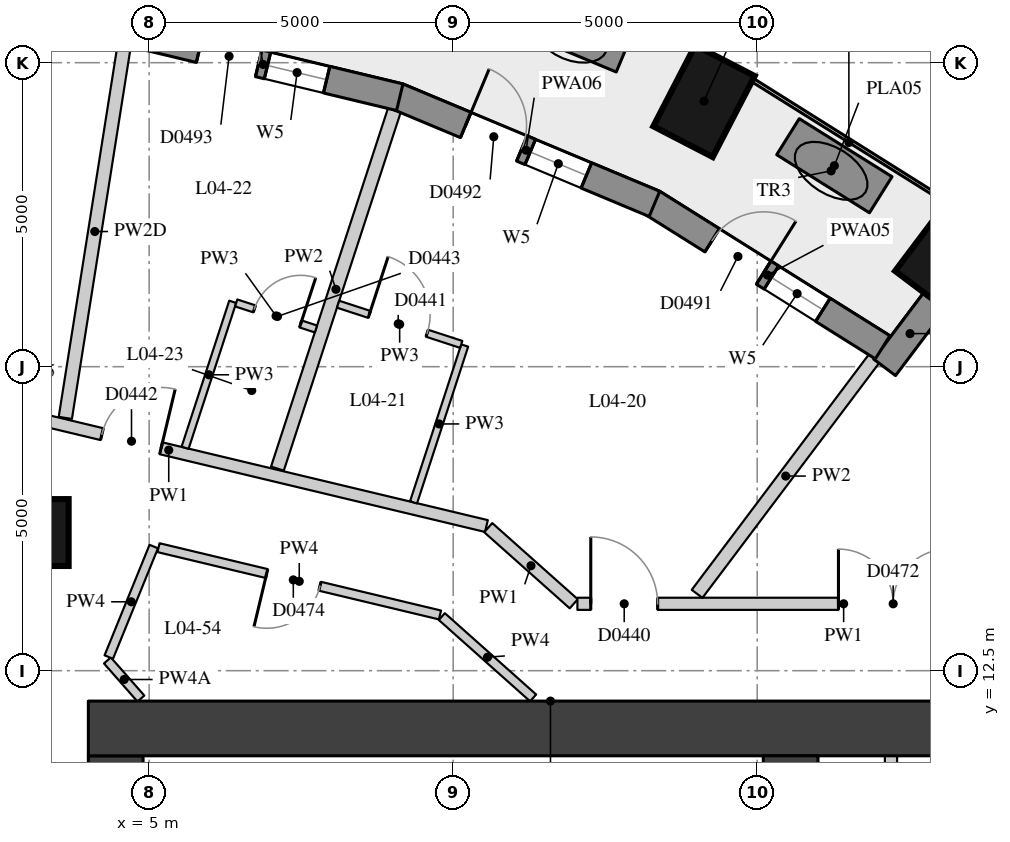
"""IFC4 building model, lengths in metres.
Left out: names, types, materials, properties, quantities, classifications, styles, units other than length and angle.
Written with IfcOpenShell. Run it as: python <this file> out.ifc"""

import sys

from ifc_helpers import new_model, si_unit, direction, frame, frame_2d, origin, origin_2d, place, context, subcontext, project, spatial, rectangle, extrude, element, fill, save


model = new_model("IFC4")
c1 = context("Model", 3, precision=1e-05, world=origin(), true_north=direction((0.0, 1.0)))
c2 = subcontext(c1, "Body", "Model", "MODEL_VIEW")
j1 = project(units=[si_unit("LENGTHUNIT", "METRE"), si_unit("PLANEANGLEUNIT", "RADIAN")], contexts=[c1])
p1 = place(None, origin())
s1 = spatial("IfcSite", under=j1, at=p1, CompositionType="ELEMENT")
p2 = place(p1, origin())
s2 = spatial("IfcBuilding", under=s1, at=p2, CompositionType="ELEMENT")
p3 = place(p2, frame((0.0, 0.0, 21.7)))
s3 = spatial("IfcBuildingStorey", under=s2, at=p3, CompositionType="ELEMENT", Elevation=21.7)
for number, where, z_axis, x_axis in (
    (1, (18.159, 19.343, 0.0), (0.0, 0.0, 1.0), (0.601, 0.799, 0.0)),
    (2, (14.125, 21.867, 0.0), (0.0, 0.0, 1.0), (0.46, 0.888, 0.0)),
):
    element("IfcColumn", number, at=place(p3, frame(where, z_axis=z_axis, x_axis=x_axis)), inside=s3, PredefinedType="COLUMN", context=c2, shape_type="SweptSolid", body=[
        extrude(rectangle(XDim=1.5, YDim=1.1, at=origin_2d()), origin(), (0.0, 0.0, 1.0), 3.3),
    ])
p4 = place(p3, frame((3.126, 14.772, 0.0), z_axis=(0.0, 0.0, 1.0), x_axis=(1.0, 0.0, 0.0)))
e3 = element("IfcColumn", 3, at=p4, inside=s3, PredefinedType="COLUMN", context=c2, shape_type="SweptSolid", body=[
    extrude(rectangle(XDim=1.1, YDim=1.1, at=origin_2d()), origin(), (0.0, 0.0, 1.0), 3.3),
])
p5 = place(p3, frame((17.932, 18.6, 0.0), z_axis=(0.0, 0.0, 1.0), x_axis=(-0.601262851241, -0.799051302306, 0.0)))
e4 = element("IfcWall", 4, at=p5, inside=s3, PredefinedType="SOLIDWALL", context=c2, shape_type="SweptSolid", body=[
    extrude(rectangle(XDim=1.391, YDim=0.45, at=frame_2d((0.696, 0.0))), origin(), (0.0, 0.0, 1.0), 3.02),
])
p6 = place(p3, frame((17.062, 17.819, 0.0), z_axis=(0.0, 0.0, 1.0), x_axis=(-0.846990101364, 0.531608660757, 0.0)))
e5 = element("IfcWall", 5, at=p6, inside=s3, PredefinedType="SOLIDWALL", context=c2, shape_type="SweptSolid", body=[
    extrude(rectangle(XDim=4.469, YDim=0.45, at=frame_2d((2.234, 0.0))), origin(), (0.0, 0.0, 1.0), 3.02),
])
p7 = place(p6, frame((1.159, 0.0, 0.4)))
e6 = element("IfcOpeningElement", 6, at=p7, cuts=e5, PredefinedType="OPENING", context=c2, shape_type="SweptSolid", body=[
    extrude(rectangle(XDim=1.0, YDim=1.75, at=frame_2d((0.5, 0.875))), frame((0.0, 0.235, 0.0), z_axis=(0.0, -1.0, 0.0), x_axis=(1.0, 0.0, 0.0)), (0.0, 0.0, 1.0), 0.47),
])
p8 = place(p6, frame((2.31, 0.0, 0.0)))
e7 = element("IfcOpeningElement", 7, at=p8, cuts=e5, PredefinedType="OPENING", context=c2, shape_type="SweptSolid", body=[
    extrude(rectangle(XDim=1.0, YDim=2.15, at=frame_2d((0.5, 1.075))), frame((0.0, 0.235, 0.0), z_axis=(0.0, -1.0, 0.0), x_axis=(1.0, 0.0, 0.0)), (0.0, 0.0, 1.0), 0.47),
])
p9 = place(p3, frame((13.31, 20.178, 0.0), z_axis=(0.0, 0.0, 1.0), x_axis=(-0.922634412489, 0.385675693935, 0.0)))
e8 = element("IfcWall", 8, at=p9, inside=s3, PredefinedType="SOLIDWALL", context=c2, shape_type="SweptSolid", body=[
    extrude(rectangle(XDim=4.577, YDim=0.45, at=frame_2d((2.288, 0.0))), origin(), (0.0, 0.0, 1.0), 3.02),
])
p10 = place(p9, frame((1.213, 0.0, 0.4)))
e9 = element("IfcOpeningElement", 9, at=p10, cuts=e8, PredefinedType="OPENING", context=c2, shape_type="SweptSolid", body=[
    extrude(rectangle(XDim=1.0, YDim=1.75, at=frame_2d((0.5, 0.875))), frame((0.0, 0.235, 0.0), z_axis=(0.0, -1.0, 0.0), x_axis=(1.0, 0.0, 0.0)), (0.0, 0.0, 1.0), 0.47),
])
p11 = place(p9, frame((2.363, 0.0, 0.0)))
e10 = element("IfcOpeningElement", 10, at=p11, cuts=e8, PredefinedType="OPENING", context=c2, shape_type="SweptSolid", body=[
    extrude(rectangle(XDim=1.0, YDim=2.15, at=frame_2d((0.5, 1.075))), frame((0.0, 0.235, 0.0), z_axis=(0.0, -1.0, 0.0), x_axis=(1.0, 0.0, 0.0)), (0.0, 0.0, 1.0), 0.47),
])
p12 = place(p3, frame((9.122, 21.932, 0.0), z_axis=(0.0, 0.0, 1.0), x_axis=(-0.972346547441, 0.233542697764, 0.0)))
e11 = element("IfcWall", 11, at=p12, inside=s3, PredefinedType="SOLIDWALL", context=c2, shape_type="SweptSolid", body=[
    extrude(rectangle(XDim=4.624, YDim=0.45, at=frame_2d((2.312, 0.0))), origin(), (0.0, 0.0, 1.0), 3.02),
])
p13 = place(p12, frame((1.237, 0.0, 0.4)))
e12 = element("IfcOpeningElement", 12, at=p13, cuts=e11, PredefinedType="OPENING", context=c2, shape_type="SweptSolid", body=[
    extrude(rectangle(XDim=1.0, YDim=1.75, at=frame_2d((0.5, 0.875))), frame((0.0, 0.235, 0.0), z_axis=(0.0, -1.0, 0.0), x_axis=(1.0, 0.0, 0.0)), (0.0, 0.0, 1.0), 0.47),
])
p14 = place(p12, frame((2.387, 0.0, 0.0)))
e13 = element("IfcOpeningElement", 13, at=p14, cuts=e11, PredefinedType="OPENING", context=c2, shape_type="SweptSolid", body=[
    extrude(rectangle(XDim=1.0, YDim=2.15, at=frame_2d((0.5, 1.075))), frame((0.0, 0.235, 0.0), z_axis=(0.0, -1.0, 0.0), x_axis=(1.0, 0.0, 0.0)), (0.0, 0.0, 1.0), 0.47),
])
p15 = place(p3, frame((17.032, 20.328, 0.0), z_axis=(0.0, 0.0, 1.0), x_axis=(-0.847609446823, 0.530620604252, 0.0)))
e14 = element("IfcWall", 14, at=p15, inside=s3, PredefinedType="USERDEFINED", context=c2, shape_type="SweptSolid", body=[
    extrude(rectangle(XDim=1.8, YDim=0.7, at=frame_2d((0.9, 0.0))), origin(), (0.0, 0.0, 1.0), 0.75),
])
p16 = place(p3, frame((12.817, 22.67, 0.0), z_axis=(0.0, 0.0, 1.0), x_axis=(-0.923000660042, 0.384798364811, 0.0)))
e15 = element("IfcWall", 15, at=p16, inside=s3, PredefinedType="USERDEFINED", context=c2, shape_type="SweptSolid", body=[
    extrude(rectangle(XDim=1.8, YDim=0.7, at=frame_2d((0.9, 0.0))), origin(), (0.0, 0.0, 1.0), 0.75),
])
p17 = place(p3, frame((4.45, -11.1, 0.0), z_axis=(0.0, 0.0, 1.0), x_axis=(0.0, 1.0, 0.0)))
e16 = element("IfcWall", 16, at=p17, inside=s3, PredefinedType="SHEAR", context=c2, shape_type="SweptSolid", body=[
    extrude(rectangle(XDim=22.2, YDim=0.9, at=frame_2d((11.1, 0.0))), origin(), (0.0, 0.0, 1.0), 3.02),
])
p18 = place(p17, frame((2.35, 0.0, 0.0)))
e17 = element("IfcOpeningElement", 17, at=p18, cuts=e16, PredefinedType="OPENING", context=c2, shape_type="SweptSolid", body=[
    extrude(rectangle(XDim=1.5, YDim=2.1, at=frame_2d((0.75, 1.05))), frame((0.0, 0.46, 0.0), z_axis=(0.0, -1.0, 0.0), x_axis=(1.0, 0.0, 0.0)), (0.0, 0.0, 1.0), 0.92),
])
p19 = place(p17, frame((5.45, 0.0, 0.0)))
e18 = element("IfcOpeningElement", 18, at=p19, cuts=e16, PredefinedType="OPENING", context=c2, shape_type="SweptSolid", body=[
    extrude(rectangle(XDim=1.8, YDim=2.1, at=frame_2d((0.9, 1.05))), frame((0.0, 0.46, 0.0), z_axis=(0.0, -1.0, 0.0), x_axis=(1.0, 0.0, 0.0)), (0.0, 0.0, 1.0), 0.92),
])
p20 = place(p17, frame((7.95, 0.0, 0.0)))
e19 = element("IfcOpeningElement", 19, at=p20, cuts=e16, PredefinedType="OPENING", context=c2, shape_type="SweptSolid", body=[
    extrude(rectangle(XDim=1.1, YDim=2.1, at=frame_2d((0.55, 1.05))), frame((0.0, 0.46, 0.0), z_axis=(0.0, -1.0, 0.0), x_axis=(1.0, 0.0, 0.0)), (0.0, 0.0, 1.0), 0.92),
])
p21 = place(p17, frame((10.6, 0.0, 0.0)))
e20 = element("IfcOpeningElement", 20, at=p21, cuts=e16, PredefinedType="OPENING", context=c2, shape_type="SweptSolid", body=[
    extrude(rectangle(XDim=1.0, YDim=2.1, at=frame_2d((0.5, 1.05))), frame((0.0, 0.46, 0.0), z_axis=(0.0, -1.0, 0.0), x_axis=(1.0, 0.0, 0.0)), (0.0, 0.0, 1.0), 0.92),
])
p22 = place(p17, frame((13.15, 0.0, 0.0)))
e21 = element("IfcOpeningElement", 21, at=p22, cuts=e16, PredefinedType="OPENING", context=c2, shape_type="SweptSolid", body=[
    extrude(rectangle(XDim=1.1, YDim=2.1, at=frame_2d((0.55, 1.05))), frame((0.0, 0.46, 0.0), z_axis=(0.0, -1.0, 0.0), x_axis=(1.0, 0.0, 0.0)), (0.0, 0.0, 1.0), 0.92),
])
p23 = place(p17, frame((14.95, 0.0, 0.0)))
e22 = element("IfcOpeningElement", 22, at=p23, cuts=e16, PredefinedType="OPENING", context=c2, shape_type="SweptSolid", body=[
    extrude(rectangle(XDim=1.8, YDim=2.1, at=frame_2d((0.9, 1.05))), frame((0.0, 0.46, 0.0), z_axis=(0.0, -1.0, 0.0), x_axis=(1.0, 0.0, 0.0)), (0.0, 0.0, 1.0), 0.92),
])
p24 = place(p17, frame((18.35, 0.0, 0.0)))
e23 = element("IfcOpeningElement", 23, at=p24, cuts=e16, PredefinedType="OPENING", context=c2, shape_type="SweptSolid", body=[
    extrude(rectangle(XDim=1.5, YDim=2.1, at=frame_2d((0.75, 1.05))), frame((0.0, 0.46, 0.0), z_axis=(0.0, -1.0, 0.0), x_axis=(1.0, 0.0, 0.0)), (0.0, 0.0, 1.0), 0.92),
])
p25 = place(p3, frame((4.0, 11.55, 0.0), z_axis=(0.0, 0.0, 1.0), x_axis=(1.0, 0.0, 0.0)))
e24 = element("IfcWall", 24, at=p25, inside=s3, PredefinedType="SHEAR", context=c2, shape_type="SweptSolid", body=[
    extrude(rectangle(XDim=15.2, YDim=0.9, at=frame_2d((7.6, 0.0))), origin(), (0.0, 0.0, 1.0), 3.02),
])
p26 = place(p3, frame((15.55, -11.1, 0.0), z_axis=(0.0, 0.0, 1.0), x_axis=(0.0, 1.0, 0.0)))
e25 = element("IfcWall", 25, at=p26, inside=s3, PredefinedType="SHEAR", context=c2, shape_type="SweptSolid", body=[
    extrude(rectangle(XDim=22.2, YDim=0.9, at=frame_2d((11.1, 0.0))), origin(), (0.0, 0.0, 1.0), 3.02),
])
p27 = place(p26, frame((15.6, 0.0, 0.0)))
e26 = element("IfcOpeningElement", 26, at=p27, cuts=e25, PredefinedType="OPENING", context=c2, shape_type="SweptSolid", body=[
    extrude(rectangle(XDim=1.0, YDim=2.1, at=frame_2d((0.5, 1.05))), frame((0.0, 0.46, 0.0), z_axis=(0.0, -1.0, 0.0), x_axis=(1.0, 0.0, 0.0)), (0.0, 0.0, 1.0), 0.92),
])
p28 = place(p26, frame((5.6, 0.0, 0.0)))
e27 = element("IfcOpeningElement", 27, at=p28, cuts=e25, PredefinedType="OPENING", context=c2, shape_type="SweptSolid", body=[
    extrude(rectangle(XDim=1.0, YDim=2.1, at=frame_2d((0.5, 1.05))), frame((0.0, 0.46, 0.0), z_axis=(0.0, -1.0, 0.0), x_axis=(1.0, 0.0, 0.0)), (0.0, 0.0, 1.0), 0.92),
])
p29 = place(p3, frame((17.2, 6.9, 0.0), z_axis=(0.0, 0.0, 1.0), x_axis=(0.0, 1.0, 0.0)))
e28 = element("IfcWall", 28, at=p29, inside=s3, PredefinedType="PARTITIONING", context=c2, shape_type="SweptSolid", body=[
    extrude(rectangle(XDim=4.2, YDim=0.2, at=frame_2d((2.1, 0.0))), origin(), (0.0, 0.0, 1.0), 3.02),
])
p30 = place(p3, frame((0.098, 17.377, 0.0), z_axis=(0.0, 0.0, 1.0), x_axis=(0.972602241469, -0.232475546864, 0.0)))
e29 = element("IfcWall", 29, at=p30, inside=s3, PredefinedType="PARTITIONING", context=c2, shape_type="SweptSolid", body=[
    extrude(rectangle(XDim=10.743, YDim=0.2, at=frame_2d((5.372, 0.0))), origin(), (0.0, 0.0, 1.0), 3.02),
])
p31 = place(p30, frame((4.242, 0.0, 0.0)))
e30 = element("IfcOpeningElement", 30, at=p31, cuts=e29, PredefinedType="OPENING", context=c2, shape_type="SweptSolid", body=[
    extrude(rectangle(XDim=1.0, YDim=2.1, at=frame_2d((0.5, 1.05))), frame((0.0, 0.11, 0.0), z_axis=(0.0, -1.0, 0.0), x_axis=(1.0, 0.0, 0.0)), (0.0, 0.0, 1.0), 0.22),
])
p32 = place(p30, frame((1.253, 0.0, 0.0)))
e31 = element("IfcOpeningElement", 31, at=p32, cuts=e29, PredefinedType="OPENING", context=c2, shape_type="SweptSolid", body=[
    extrude(rectangle(XDim=0.9, YDim=2.1, at=frame_2d((0.45, 1.05))), frame((0.0, 0.11, 0.0), z_axis=(0.0, -1.0, 0.0), x_axis=(1.0, 0.0, 0.0)), (0.0, 0.0, 1.0), 0.22),
])
p33 = place(p3, frame((10.576, 14.853, 0.0), z_axis=(0.0, 0.0, 1.0), x_axis=(0.746758163178, -0.665095666597, 0.0)))
e32 = element("IfcWall", 32, at=p33, inside=s3, PredefinedType="PARTITIONING", context=c2, shape_type="SweptSolid", body=[
    extrude(rectangle(XDim=1.884, YDim=0.2, at=frame_2d((0.942, 0.0))), origin(), (0.0, 0.0, 1.0), 3.02),
])
p34 = place(p3, frame((12.043, 13.6, 0.0), z_axis=(0.0, 0.0, 1.0), x_axis=(1.0, 0.0, 0.0)))
e33 = element("IfcWall", 33, at=p34, inside=s3, PredefinedType="PARTITIONING", context=c2, shape_type="SweptSolid", body=[
    extrude(rectangle(XDim=8.757, YDim=0.2, at=frame_2d((4.378, 0.0))), origin(), (0.0, 0.0, 1.0), 3.02),
])
p35 = place(p34, frame((0.22, 0.0, 0.0)))
e34 = element("IfcOpeningElement", 34, at=p35, cuts=e33, PredefinedType="OPENING", context=c2, shape_type="SweptSolid", body=[
    extrude(rectangle(XDim=1.1, YDim=2.1, at=frame_2d((0.55, 1.05))), frame((0.0, 0.11, 0.0), z_axis=(0.0, -1.0, 0.0), x_axis=(1.0, 0.0, 0.0)), (0.0, 0.0, 1.0), 0.22),
])
p36 = place(p34, frame((4.293, 0.0, 0.0)))
e35 = element("IfcOpeningElement", 35, at=p36, cuts=e33, PredefinedType="OPENING", context=c2, shape_type="SweptSolid", body=[
    extrude(rectangle(XDim=1.8, YDim=2.1, at=frame_2d((0.9, 1.05))), frame((0.0, 0.11, 0.0), z_axis=(0.0, -1.0, 0.0), x_axis=(1.0, 0.0, 0.0)), (0.0, 0.0, 1.0), 0.22),
])
p37 = place(p3, frame((4.865, 12.042, 0.0), z_axis=(0.0, 0.0, 1.0), x_axis=(-0.660014599896, 0.751252772323, 0.0)))
e36 = element("IfcWall", 36, at=p37, inside=s3, PredefinedType="PARTITIONING", context=c2, shape_type="SweptSolid", body=[
    extrude(rectangle(XDim=0.835, YDim=0.15, at=frame_2d((0.417, 0.0))), origin(), (0.0, 0.0, 1.0), 2.57),
])
p38 = place(p3, frame((4.336, 12.724, 0.0), z_axis=(0.0, 0.0, 1.0), x_axis=(0.376897652409, 0.926254910707, 0.0)))
e37 = element("IfcWall", 37, at=p38, inside=s3, PredefinedType="PARTITIONING", context=c2, shape_type="SweptSolid", body=[
    extrude(rectangle(XDim=1.962, YDim=0.15, at=frame_2d((0.981, 0.0))), origin(), (0.0, 0.0, 1.0), 3.02),
])
p39 = place(p3, frame((5.154, 14.523, 0.0), z_axis=(0.0, 0.0, 1.0), x_axis=(0.972595031209, -0.232505710182, 0.0)))
e38 = element("IfcWall", 38, at=p39, inside=s3, PredefinedType="PARTITIONING", context=c2, shape_type="SweptSolid", body=[
    extrude(rectangle(XDim=4.76, YDim=0.15, at=frame_2d((2.38, 0.0))), origin(), (0.0, 0.0, 1.0), 3.02),
])
p40 = place(p39, frame((1.829, 0.0, 0.0)))
e39 = element("IfcOpeningElement", 39, at=p40, cuts=e38, PredefinedType="OPENING", context=c2, shape_type="SweptSolid", body=[
    extrude(rectangle(XDim=0.9, YDim=2.1, at=frame_2d((0.45, 1.05))), frame((0.0, 0.085, 0.0), z_axis=(0.0, -1.0, 0.0), x_axis=(1.0, 0.0, 0.0)), (0.0, 0.0, 1.0), 0.17),
])
p41 = place(p3, frame((9.813, 13.39, 0.0), z_axis=(0.0, 0.0, 1.0), x_axis=(0.746772740714, -0.665079298825, 0.0)))
e40 = element("IfcWall", 40, at=p41, inside=s3, PredefinedType="PARTITIONING", context=c2, shape_type="SweptSolid", body=[
    extrude(rectangle(XDim=2.011, YDim=0.15, at=frame_2d((1.006, 0.0))), origin(), (0.0, 0.0, 1.0), 3.02),
])
p42 = place(p3, frame((16.927, 17.638, 0.0), z_axis=(0.0, 0.0, 1.0), x_axis=(-0.601183583641, -0.799110942711, 0.0)))
e41 = element("IfcWall", 41, at=p42, inside=s3, PredefinedType="PARTITIONING", context=c2, shape_type="SweptSolid", body=[
    extrude(rectangle(XDim=4.849, YDim=0.22, at=frame_2d((2.424, 0.0))), origin(), (0.0, 0.0, 1.0), 3.02),
])
p43 = place(p3, frame((9.034, 21.721, 0.0), z_axis=(0.0, 0.0, 1.0), x_axis=(-0.310247180826, -0.950655924501, 0.0)))
e42 = element("IfcWall", 42, at=p43, inside=s3, PredefinedType="PARTITIONING", context=c2, shape_type="SweptSolid", body=[
    extrude(rectangle(XDim=6.203, YDim=0.22, at=frame_2d((3.102, 0.0))), origin(), (0.0, 0.0, 1.0), 3.02),
])
p44 = place(p3, frame((4.591, 22.789, 0.0), z_axis=(0.0, 0.0, 1.0), x_axis=(-0.15615243256, -0.987732968877, 0.0)))
e43 = element("IfcWall", 43, at=p44, inside=s3, PredefinedType="PARTITIONING", context=c2, shape_type="SweptSolid", body=[
    extrude(rectangle(XDim=6.207, YDim=0.22, at=frame_2d((3.104, 0.0))), origin(), (0.0, 0.0, 1.0), 2.47),
])
p45 = place(p3, frame((9.348, 15.269, 0.0), z_axis=(0.0, 0.0, 1.0), x_axis=(0.310147893553, 0.950688321231, 0.0)))
e44 = element("IfcWall", 44, at=p45, inside=s3, PredefinedType="PARTITIONING", context=c2, shape_type="SweptSolid", body=[
    extrude(rectangle(XDim=2.713, YDim=0.12, at=frame_2d((1.357, 0.0))), origin(), (0.0, 0.0, 1.0), 3.02),
])
p46 = place(p3, frame((5.591, 16.167, 0.0), z_axis=(0.0, 0.0, 1.0), x_axis=(0.310246659943, 0.950656094492, 0.0)))
e45 = element("IfcWall", 45, at=p46, inside=s3, PredefinedType="PARTITIONING", context=c2, shape_type="SweptSolid", body=[
    extrude(rectangle(XDim=2.525, YDim=0.12, at=frame_2d((1.263, 0.0))), origin(), (0.0, 0.0, 1.0), 3.02),
])
p47 = place(p3, frame((10.132, 17.867, 0.0), z_axis=(0.0, 0.0, 1.0), x_axis=(-0.950681354321, 0.310169248227, 0.0)))
e46 = element("IfcWall", 46, at=p47, inside=s3, PredefinedType="PARTITIONING", context=c2, shape_type="SweptSolid", body=[
    extrude(rectangle(XDim=2.13, YDim=0.12, at=frame_2d((1.065, 0.0))), origin(), (0.0, 0.0, 1.0), 3.02),
])
p48 = place(p47, frame((0.59, 0.0, 0.0)))
e47 = element("IfcOpeningElement", 47, at=p48, cuts=e46, PredefinedType="OPENING", context=c2, shape_type="SweptSolid", body=[
    extrude(rectangle(XDim=1.0, YDim=2.1, at=frame_2d((0.5, 1.05))), frame((0.0, 0.07, 0.0), z_axis=(0.0, -1.0, 0.0), x_axis=(1.0, 0.0, 0.0)), (0.0, 0.0, 1.0), 0.14),
])
p49 = place(p3, frame((6.431, 18.549, 0.0), z_axis=(0.0, 0.0, 1.0), x_axis=(0.950628893115, -0.310329997864, 0.0)))
e48 = element("IfcWall", 48, at=p49, inside=s3, PredefinedType="PARTITIONING", context=c2, shape_type="SweptSolid", body=[
    extrude(rectangle(XDim=1.38, YDim=0.12, at=frame_2d((0.69, 0.0))), origin(), (0.0, 0.0, 1.0), 3.02),
])
p50 = place(p49, frame((0.315, 0.0, 0.0)))
e49 = element("IfcOpeningElement", 49, at=p50, cuts=e48, PredefinedType="OPENING", context=c2, shape_type="SweptSolid", body=[
    extrude(rectangle(XDim=0.8, YDim=2.1, at=frame_2d((0.4, 1.05))), frame((0.0, 0.07, 0.0), z_axis=(0.0, -1.0, 0.0), x_axis=(1.0, 0.0, 0.0)), (0.0, 0.0, 1.0), 0.14),
])
p51 = place(p7, origin())
e50 = element("IfcWindow", 50, at=p51, inside=s3, PartitioningType="SINGLE_PANEL", PredefinedType="WINDOW", context=c2, shape_type="SweptSolid", body=[
    extrude(rectangle(XDim=1.0, YDim=1.75, at=frame_2d((0.5, 0.875))), frame((0.0, 0.035, 0.0), z_axis=(0.0, -1.0, 0.0), x_axis=(1.0, 0.0, 0.0)), (0.0, 0.0, 1.0), 0.06),
])
fill(e6, e50)
p52 = place(p8, frame((1.0, 0.0, 0.0), z_axis=(0.0, 0.0, 1.0), x_axis=(-1.0, 0.0, 0.0)))
e51 = element("IfcDoor", 51, at=p52, inside=s3, OperationType="SINGLE_SWING_RIGHT", PredefinedType="DOOR", context=c2, shape_type="SweptSolid", body=[
    extrude(rectangle(XDim=1.0, YDim=2.15, at=frame_2d((0.5, 1.075))), frame((0.0, 0.075, 0.0), z_axis=(0.0, -1.0, 0.0), x_axis=(1.0, 0.0, 0.0)), (0.0, 0.0, 1.0), 0.05),
])
fill(e7, e51)
p53 = place(p10, origin())
e52 = element("IfcWindow", 52, at=p53, inside=s3, PartitioningType="SINGLE_PANEL", PredefinedType="WINDOW", context=c2, shape_type="SweptSolid", body=[
    extrude(rectangle(XDim=1.0, YDim=1.75, at=frame_2d((0.5, 0.875))), frame((0.0, 0.035, 0.0), z_axis=(0.0, -1.0, 0.0), x_axis=(1.0, 0.0, 0.0)), (0.0, 0.0, 1.0), 0.06),
])
fill(e9, e52)
p54 = place(p11, frame((1.0, 0.0, 0.0), z_axis=(0.0, 0.0, 1.0), x_axis=(-1.0, 0.0, 0.0)))
e53 = element("IfcDoor", 53, at=p54, inside=s3, OperationType="SINGLE_SWING_LEFT", PredefinedType="DOOR", context=c2, shape_type="SweptSolid", body=[
    extrude(rectangle(XDim=1.0, YDim=2.15, at=frame_2d((0.5, 1.075))), frame((0.0, 0.075, 0.0), z_axis=(0.0, -1.0, 0.0), x_axis=(1.0, 0.0, 0.0)), (0.0, 0.0, 1.0), 0.05),
])
fill(e10, e53)
p55 = place(p13, origin())
e54 = element("IfcWindow", 54, at=p55, inside=s3, PartitioningType="SINGLE_PANEL", PredefinedType="WINDOW", context=c2, shape_type="SweptSolid", body=[
    extrude(rectangle(XDim=1.0, YDim=1.75, at=frame_2d((0.5, 0.875))), frame((0.0, 0.035, 0.0), z_axis=(0.0, -1.0, 0.0), x_axis=(1.0, 0.0, 0.0)), (0.0, 0.0, 1.0), 0.06),
])
fill(e12, e54)
p56 = place(p14, frame((1.0, 0.0, 0.0), z_axis=(0.0, 0.0, 1.0), x_axis=(-1.0, 0.0, 0.0)))
e55 = element("IfcDoor", 55, at=p56, inside=s3, OperationType="SINGLE_SWING_LEFT", PredefinedType="DOOR", context=c2, shape_type="SweptSolid", body=[
    extrude(rectangle(XDim=1.0, YDim=2.15, at=frame_2d((0.5, 1.075))), frame((0.0, 0.075, 0.0), z_axis=(0.0, -1.0, 0.0), x_axis=(1.0, 0.0, 0.0)), (0.0, 0.0, 1.0), 0.05),
])
fill(e13, e55)
p57 = place(p35, origin())
e56 = element("IfcDoor", 56, at=p57, inside=s3, OperationType="SINGLE_SWING_LEFT", PredefinedType="DOOR", context=c2, shape_type="SweptSolid", body=[
    extrude(rectangle(XDim=1.1, YDim=2.1, at=frame_2d((0.55, 1.05))), frame((0.0, 0.025, 0.0), z_axis=(0.0, -1.0, 0.0), x_axis=(1.0, 0.0, 0.0)), (0.0, 0.0, 1.0), 0.05),
])
fill(e34, e56)
p58 = place(p48, origin())
e57 = element("IfcDoor", 57, at=p58, inside=s3, OperationType="SINGLE_SWING_LEFT", PredefinedType="DOOR", context=c2, shape_type="SweptSolid", body=[
    extrude(rectangle(XDim=1.0, YDim=2.1, at=frame_2d((0.5, 1.05))), frame((0.0, 0.025, 0.0), z_axis=(0.0, -1.0, 0.0), x_axis=(1.0, 0.0, 0.0)), (0.0, 0.0, 1.0), 0.05),
])
fill(e47, e57)
p59 = place(p31, origin())
e58 = element("IfcDoor", 58, at=p59, inside=s3, OperationType="SINGLE_SWING_RIGHT", PredefinedType="DOOR", context=c2, shape_type="SweptSolid", body=[
    extrude(rectangle(XDim=1.0, YDim=2.1, at=frame_2d((0.5, 1.05))), frame((0.0, 0.025, 0.0), z_axis=(0.0, -1.0, 0.0), x_axis=(1.0, 0.0, 0.0)), (0.0, 0.0, 1.0), 0.05),
])
fill(e30, e58)
p60 = place(p50, origin())
e59 = element("IfcDoor", 59, at=p60, inside=s3, OperationType="SINGLE_SWING_RIGHT", PredefinedType="DOOR", context=c2, shape_type="SweptSolid", body=[
    extrude(rectangle(XDim=0.8, YDim=2.1, at=frame_2d((0.4, 1.05))), frame((0.0, 0.025, 0.0), z_axis=(0.0, -1.0, 0.0), x_axis=(1.0, 0.0, 0.0)), (0.0, 0.0, 1.0), 0.05),
])
fill(e49, e59)
p61 = place(p36, origin())
e60 = element("IfcDoor", 60, at=p61, inside=s3, OperationType="DOUBLE_DOOR_SINGLE_SWING", PredefinedType="DOOR", context=c2, shape_type="SweptSolid", body=[
    extrude(rectangle(XDim=1.8, YDim=2.1, at=frame_2d((0.9, 1.05))), frame((0.0, 0.025, 0.0), z_axis=(0.0, -1.0, 0.0), x_axis=(1.0, 0.0, 0.0)), (0.0, 0.0, 1.0), 0.05),
])
fill(e35, e60)
p62 = place(p40, origin())
e61 = element("IfcDoor", 61, at=p62, inside=s3, OperationType="SINGLE_SWING_RIGHT", PredefinedType="DOOR", context=c2, shape_type="SweptSolid", body=[
    extrude(rectangle(XDim=0.9, YDim=2.1, at=frame_2d((0.45, 1.05))), frame((0.0, 0.025, 0.0), z_axis=(0.0, -1.0, 0.0), x_axis=(1.0, 0.0, 0.0)), (0.0, 0.0, 1.0), 0.05),
])
fill(e39, e61)
save(model, sys.argv[1])
